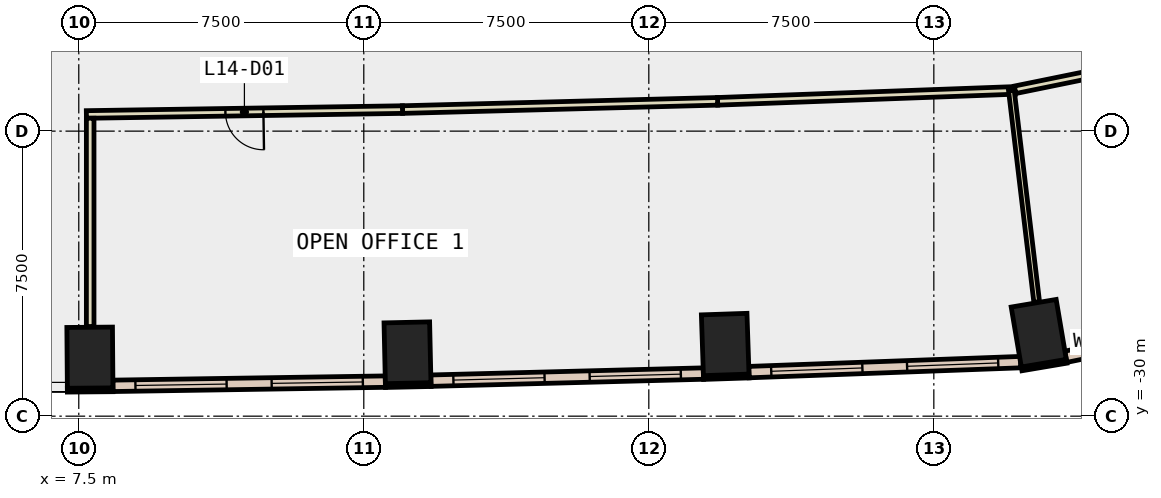
"""IFC4 building model, lengths in metres.
Left out: names, types, materials, properties, quantities, classifications, styles, units other than length and angle.
Written with IfcOpenShell. Run it as: python <this file> out.ifc"""

import sys

from ifc_helpers import new_model, si_unit, direction, frame, frame_2d, origin, origin_2d, place, context, subcontext, project, spatial, rectangle, extrude, element, fill, save


model = new_model("IFC4")
c1 = context("Model", 3, precision=1e-05, world=origin(), true_north=direction((0.0, 1.0)))
c2 = subcontext(c1, "Body", "Model", "MODEL_VIEW")
j1 = project(units=[si_unit("LENGTHUNIT", "METRE"), si_unit("PLANEANGLEUNIT", "RADIAN")], contexts=[c1])
p1 = place(None, origin())
s1 = spatial("IfcSite", under=j1, at=p1, CompositionType="ELEMENT")
p2 = place(p1, origin())
s2 = spatial("IfcBuilding", under=s1, at=p2, CompositionType="ELEMENT")
p3 = place(p2, frame((0.0, 0.0, 68.6)))
s3 = spatial("IfcBuildingStorey", under=s2, at=p3, CompositionType="ELEMENT", Elevation=68.6)
for number, where, z_axis, x_axis in (
    (1, (7.793, -28.461, -0.4), (0.0, 0.0, 1.0), (1.0, 0.008, 0.0)),
    (2, (16.15, -28.332, -0.4), (0.0, 0.0, 1.0), (1.0, 0.022, 0.0)),
    (3, (24.51, -28.114, -0.4), (0.0, 0.0, 1.0), (0.999, 0.034, 0.0)),
    (4, (32.761, -27.818, -0.4), (0.0, 0.0, 1.0), (0.986, 0.167, 0.0)),
):
    element("IfcColumn", number, at=place(p3, frame(where, z_axis=z_axis, x_axis=x_axis)), inside=s3, PredefinedType="COLUMN", context=c2, shape_type="SweptSolid", body=[
        extrude(rectangle(XDim=1.2, YDim=1.6, at=origin_2d()), origin(), (0.0, 0.0, 1.0), 4.2),
    ])
p4 = place(p3, frame((7.2, -29.316, 0.0), z_axis=(0.0, 0.0, 1.0), x_axis=(0.999965208912, 0.008341520563, 0.0)))
e5 = element("IfcWall", 5, at=p4, inside=s3, PredefinedType="STANDARD", context=c2, shape_type="SweptSolid", body=[
    extrude(rectangle(XDim=1.2, YDim=0.1, at=frame_2d((0.6, 0.0))), origin(), (0.0, 0.0, 1.0), 3.8),
])
p5 = place(p3, frame((15.569, -29.195, 0.0), z_axis=(0.0, 0.0, 1.0), x_axis=(0.999763115755, 0.021764934565, 0.0)))
e6 = element("IfcWall", 6, at=p5, inside=s3, PredefinedType="STANDARD", context=c2, shape_type="SweptSolid", body=[
    extrude(rectangle(XDim=1.2, YDim=0.1, at=frame_2d((0.6, 0.0))), origin(), (0.0, 0.0, 1.0), 3.8),
])
for number, where, z_axis, x_axis in (
    (7, (23.939, -28.983, 0.0), (0.0, 0.0, 1.0), (0.999, 0.033, 0.0)),
    (8, (32.311, -28.756, 0.0), (0.0, 0.0, 1.0), (0.986, 0.167, 0.0)),
):
    element("IfcWall", number, at=place(p3, frame(where, z_axis=z_axis, x_axis=x_axis)), inside=s3, PredefinedType="STANDARD", context=c2, shape_type="SweptSolid", body=[
        extrude(rectangle(XDim=1.2, YDim=0.1, at=frame_2d((0.6, 0.0))), origin(), (0.0, 0.0, 1.0), 3.8),
    ])
p6 = place(p3, frame((8.398, -29.202, 0.0), z_axis=(0.0, 0.0, 1.0), x_axis=(0.99988053916, 0.015456629942, 0.0)))
e9 = element("IfcWall", 9, at=p6, inside=s3, PredefinedType="STANDARD", context=c2, shape_type="SweptSolid", body=[
    extrude(rectangle(XDim=7.171, YDim=0.3, at=frame_2d((3.585, 0.0))), origin(), (0.0, 0.0, 1.0), 3.8),
])
p7 = place(p6, frame((0.593, 0.0, 0.9)))
e10 = element("IfcOpeningElement", 10, at=p7, cuts=e9, PredefinedType="OPENING", context=c2, shape_type="SweptSolid", body=[
    extrude(rectangle(XDim=2.4, YDim=2.6, at=frame_2d((1.2, 1.3))), frame((0.0, 0.16, 0.0), z_axis=(0.0, -1.0, 0.0), x_axis=(1.0, 0.0, 0.0)), (0.0, 0.0, 1.0), 0.32),
])
p8 = place(p6, frame((4.178, 0.0, 0.9)))
e11 = element("IfcOpeningElement", 11, at=p8, cuts=e9, PredefinedType="OPENING", context=c2, shape_type="SweptSolid", body=[
    extrude(rectangle(XDim=2.4, YDim=2.6, at=frame_2d((1.2, 1.3))), frame((0.0, 0.16, 0.0), z_axis=(0.0, -1.0, 0.0), x_axis=(1.0, 0.0, 0.0)), (0.0, 0.0, 1.0), 0.32),
])
p9 = place(p3, frame((16.765, -29.066, 0.0), z_axis=(0.0, 0.0, 1.0), x_axis=(0.999660132619, 0.026069508106, 0.0)))
e12 = element("IfcWall", 12, at=p9, inside=s3, PredefinedType="STANDARD", context=c2, shape_type="SweptSolid", body=[
    extrude(rectangle(XDim=7.174, YDim=0.3, at=frame_2d((3.587, 0.0))), origin(), (0.0, 0.0, 1.0), 3.8),
])
p10 = place(p9, frame((0.593, 0.0, 0.9)))
e13 = element("IfcOpeningElement", 13, at=p10, cuts=e12, PredefinedType="OPENING", context=c2, shape_type="SweptSolid", body=[
    extrude(rectangle(XDim=2.4, YDim=2.6, at=frame_2d((1.2, 1.3))), frame((0.0, 0.16, 0.0), z_axis=(0.0, -1.0, 0.0), x_axis=(1.0, 0.0, 0.0)), (0.0, 0.0, 1.0), 0.32),
])
p11 = place(p9, frame((4.18, 0.0, 0.9)))
e14 = element("IfcOpeningElement", 14, at=p11, cuts=e12, PredefinedType="OPENING", context=c2, shape_type="SweptSolid", body=[
    extrude(rectangle(XDim=2.4, YDim=2.6, at=frame_2d((1.2, 1.3))), frame((0.0, 0.16, 0.0), z_axis=(0.0, -1.0, 0.0), x_axis=(1.0, 0.0, 0.0)), (0.0, 0.0, 1.0), 0.32),
])
p12 = place(p3, frame((25.134, -28.841, 0.0), z_axis=(0.0, 0.0, 1.0), x_axis=(0.999322852286, 0.036794522671, 0.0)))
e15 = element("IfcWall", 15, at=p12, inside=s3, PredefinedType="STANDARD", context=c2, shape_type="SweptSolid", body=[
    extrude(rectangle(XDim=7.153, YDim=0.3, at=frame_2d((3.576, 0.0))), origin(), (0.0, 0.0, 1.0), 3.8),
])
p13 = place(p12, frame((0.588, 0.0, 0.9)))
e16 = element("IfcOpeningElement", 16, at=p13, cuts=e15, PredefinedType="OPENING", context=c2, shape_type="SweptSolid", body=[
    extrude(rectangle(XDim=2.4, YDim=2.6, at=frame_2d((1.2, 1.3))), frame((0.0, 0.16, 0.0), z_axis=(0.0, -1.0, 0.0), x_axis=(1.0, 0.0, 0.0)), (0.0, 0.0, 1.0), 0.32),
])
p14 = place(p12, frame((4.165, 0.0, 0.9)))
e17 = element("IfcOpeningElement", 17, at=p14, cuts=e15, PredefinedType="OPENING", context=c2, shape_type="SweptSolid", body=[
    extrude(rectangle(XDim=2.4, YDim=2.6, at=frame_2d((1.2, 1.3))), frame((0.0, 0.16, 0.0), z_axis=(0.0, -1.0, 0.0), x_axis=(1.0, 0.0, 0.0)), (0.0, 0.0, 1.0), 0.32),
])
p15 = place(p3, frame((33.473, -28.437, 0.0), z_axis=(0.0, 0.0, 1.0), x_axis=(0.979824229846, 0.199861148317, 0.0)))
e18 = element("IfcWall", 18, at=p15, inside=s3, PredefinedType="STANDARD", context=c2, shape_type="SweptSolid", body=[
    extrude(rectangle(XDim=3.822, YDim=0.3, at=frame_2d((1.911, 0.0))), origin(), (0.0, 0.0, 1.0), 3.8),
])
p16 = place(p15, frame((1.211, 0.0, 0.9)))
e19 = element("IfcOpeningElement", 19, at=p16, cuts=e18, PredefinedType="OPENING", context=c2, shape_type="SweptSolid", body=[
    extrude(rectangle(XDim=1.4, YDim=2.6, at=frame_2d((0.7, 1.3))), frame((0.0, 0.16, 0.0), z_axis=(0.0, -1.0, 0.0), x_axis=(1.0, 0.0, 0.0)), (0.0, 0.0, 1.0), 0.32),
])
p17 = place(p3, frame((32.141, -21.428, 0.0), z_axis=(0.0, 0.0, 1.0), x_axis=(-0.999324021202, -0.036762761723, 0.0)))
e20 = element("IfcWall", 20, at=p17, inside=s3, PredefinedType="PARTITIONING", context=c2, shape_type="SweptSolid", body=[
    extrude(rectangle(XDim=7.836, YDim=0.2, at=frame_2d((3.918, 0.0))), origin(), (0.0, 0.0, 1.0), 3.8),
])
p18 = place(p3, frame((24.31, -21.716, 0.0), z_axis=(0.0, 0.0, 1.0), x_axis=(-0.999657616542, -0.02616581148, 0.0)))
e21 = element("IfcWall", 21, at=p18, inside=s3, PredefinedType="PARTITIONING", context=c2, shape_type="SweptSolid", body=[
    extrude(rectangle(XDim=8.295, YDim=0.2, at=frame_2d((4.147, 0.0))), origin(), (0.0, 0.0, 1.0), 3.8),
])
p19 = place(p3, frame((16.018, -21.933, 0.0), z_axis=(0.0, 0.0, 1.0), x_axis=(-0.999879942341, -0.015495189738, 0.0)))
e22 = element("IfcWall", 22, at=p19, inside=s3, PredefinedType="PARTITIONING", context=c2, shape_type="SweptSolid", body=[
    extrude(rectangle(XDim=8.319, YDim=0.2, at=frame_2d((4.16, 0.0))), origin(), (0.0, 0.0, 1.0), 3.8),
])
p20 = place(p19, frame((3.66, 0.0, 0.0)))
e23 = element("IfcOpeningElement", 23, at=p20, cuts=e22, PredefinedType="OPENING", context=c2, shape_type="SweptSolid", body=[
    extrude(rectangle(XDim=1.0, YDim=2.1, at=frame_2d((0.5, 1.05))), frame((0.0, 0.11, 0.0), z_axis=(0.0, -1.0, 0.0), x_axis=(1.0, 0.0, 0.0)), (0.0, 0.0, 1.0), 0.22),
])
p21 = place(p3, frame((34.523, -20.926, 0.0), z_axis=(0.0, 0.0, 1.0), x_axis=(-0.979840552367, -0.199781110063, 0.0)))
e24 = element("IfcWall", 24, at=p21, inside=s3, PredefinedType="PARTITIONING", context=c2, shape_type="SweptSolid", body=[
    extrude(rectangle(XDim=2.433, YDim=0.2, at=frame_2d((1.217, 0.0))), origin(), (0.0, 0.0, 1.0), 3.8),
])
p22 = place(p3, frame((7.8, -22.16, 0.0), z_axis=(0.0, 0.0, 1.0), x_axis=(0.0, -1.0, 0.0)))
e25 = element("IfcWall", 25, at=p22, inside=s3, PredefinedType="PARTITIONING", context=c2, shape_type="SweptSolid", body=[
    extrude(rectangle(XDim=5.481, YDim=0.2, at=frame_2d((2.741, 0.0))), origin(), (0.0, 0.0, 1.0), 3.8),
])
p23 = place(p3, frame((32.041, -21.432, 0.0), z_axis=(0.0, 0.0, 1.0), x_axis=(0.118848018273, -0.992912457648, 0.0)))
e26 = element("IfcWall", 26, at=p23, inside=s3, PredefinedType="PARTITIONING", context=c2, shape_type="SweptSolid", body=[
    extrude(rectangle(XDim=5.604, YDim=0.15, at=frame_2d((2.802, 0.0))), origin(), (0.0, 0.0, 1.0), 3.8),
])
p24 = place(p7, origin())
e27 = element("IfcWindow", 27, at=p24, inside=s3, PartitioningType="SINGLE_PANEL", PredefinedType="WINDOW", context=c2, shape_type="SweptSolid", body=[
    extrude(rectangle(XDim=2.4, YDim=2.6, at=frame_2d((1.2, 1.3))), frame((0.0, 0.03, 0.0), z_axis=(0.0, -1.0, 0.0), x_axis=(1.0, 0.0, 0.0)), (0.0, 0.0, 1.0), 0.06),
])
fill(e10, e27)
p25 = place(p8, origin())
e28 = element("IfcWindow", 28, at=p25, inside=s3, PartitioningType="SINGLE_PANEL", PredefinedType="WINDOW", context=c2, shape_type="SweptSolid", body=[
    extrude(rectangle(XDim=2.4, YDim=2.6, at=frame_2d((1.2, 1.3))), frame((0.0, 0.03, 0.0), z_axis=(0.0, -1.0, 0.0), x_axis=(1.0, 0.0, 0.0)), (0.0, 0.0, 1.0), 0.06),
])
fill(e11, e28)
p26 = place(p10, origin())
e29 = element("IfcWindow", 29, at=p26, inside=s3, PartitioningType="SINGLE_PANEL", PredefinedType="WINDOW", context=c2, shape_type="SweptSolid", body=[
    extrude(rectangle(XDim=2.4, YDim=2.6, at=frame_2d((1.2, 1.3))), frame((0.0, 0.03, 0.0), z_axis=(0.0, -1.0, 0.0), x_axis=(1.0, 0.0, 0.0)), (0.0, 0.0, 1.0), 0.06),
])
fill(e13, e29)
p27 = place(p11, origin())
e30 = element("IfcWindow", 30, at=p27, inside=s3, PartitioningType="SINGLE_PANEL", PredefinedType="WINDOW", context=c2, shape_type="SweptSolid", body=[
    extrude(rectangle(XDim=2.4, YDim=2.6, at=frame_2d((1.2, 1.3))), frame((0.0, 0.03, 0.0), z_axis=(0.0, -1.0, 0.0), x_axis=(1.0, 0.0, 0.0)), (0.0, 0.0, 1.0), 0.06),
])
fill(e14, e30)
p28 = place(p13, origin())
e31 = element("IfcWindow", 31, at=p28, inside=s3, PartitioningType="SINGLE_PANEL", PredefinedType="WINDOW", context=c2, shape_type="SweptSolid", body=[
    extrude(rectangle(XDim=2.4, YDim=2.6, at=frame_2d((1.2, 1.3))), frame((0.0, 0.03, 0.0), z_axis=(0.0, -1.0, 0.0), x_axis=(1.0, 0.0, 0.0)), (0.0, 0.0, 1.0), 0.06),
])
fill(e16, e31)
p29 = place(p14, origin())
e32 = element("IfcWindow", 32, at=p29, inside=s3, PartitioningType="SINGLE_PANEL", PredefinedType="WINDOW", context=c2, shape_type="SweptSolid", body=[
    extrude(rectangle(XDim=2.4, YDim=2.6, at=frame_2d((1.2, 1.3))), frame((0.0, 0.03, 0.0), z_axis=(0.0, -1.0, 0.0), x_axis=(1.0, 0.0, 0.0)), (0.0, 0.0, 1.0), 0.06),
])
fill(e17, e32)
p30 = place(p20, origin())
e33 = element("IfcDoor", 33, at=p30, inside=s3, OperationType="SINGLE_SWING_LEFT", PredefinedType="DOOR", context=c2, shape_type="SweptSolid", body=[
    extrude(rectangle(XDim=1.0, YDim=2.1, at=frame_2d((0.5, 1.05))), frame((0.0, 0.025, 0.0), z_axis=(0.0, -1.0, 0.0), x_axis=(1.0, 0.0, 0.0)), (0.0, 0.0, 1.0), 0.05),
])
fill(e23, e33)
save(model, sys.argv[1])
